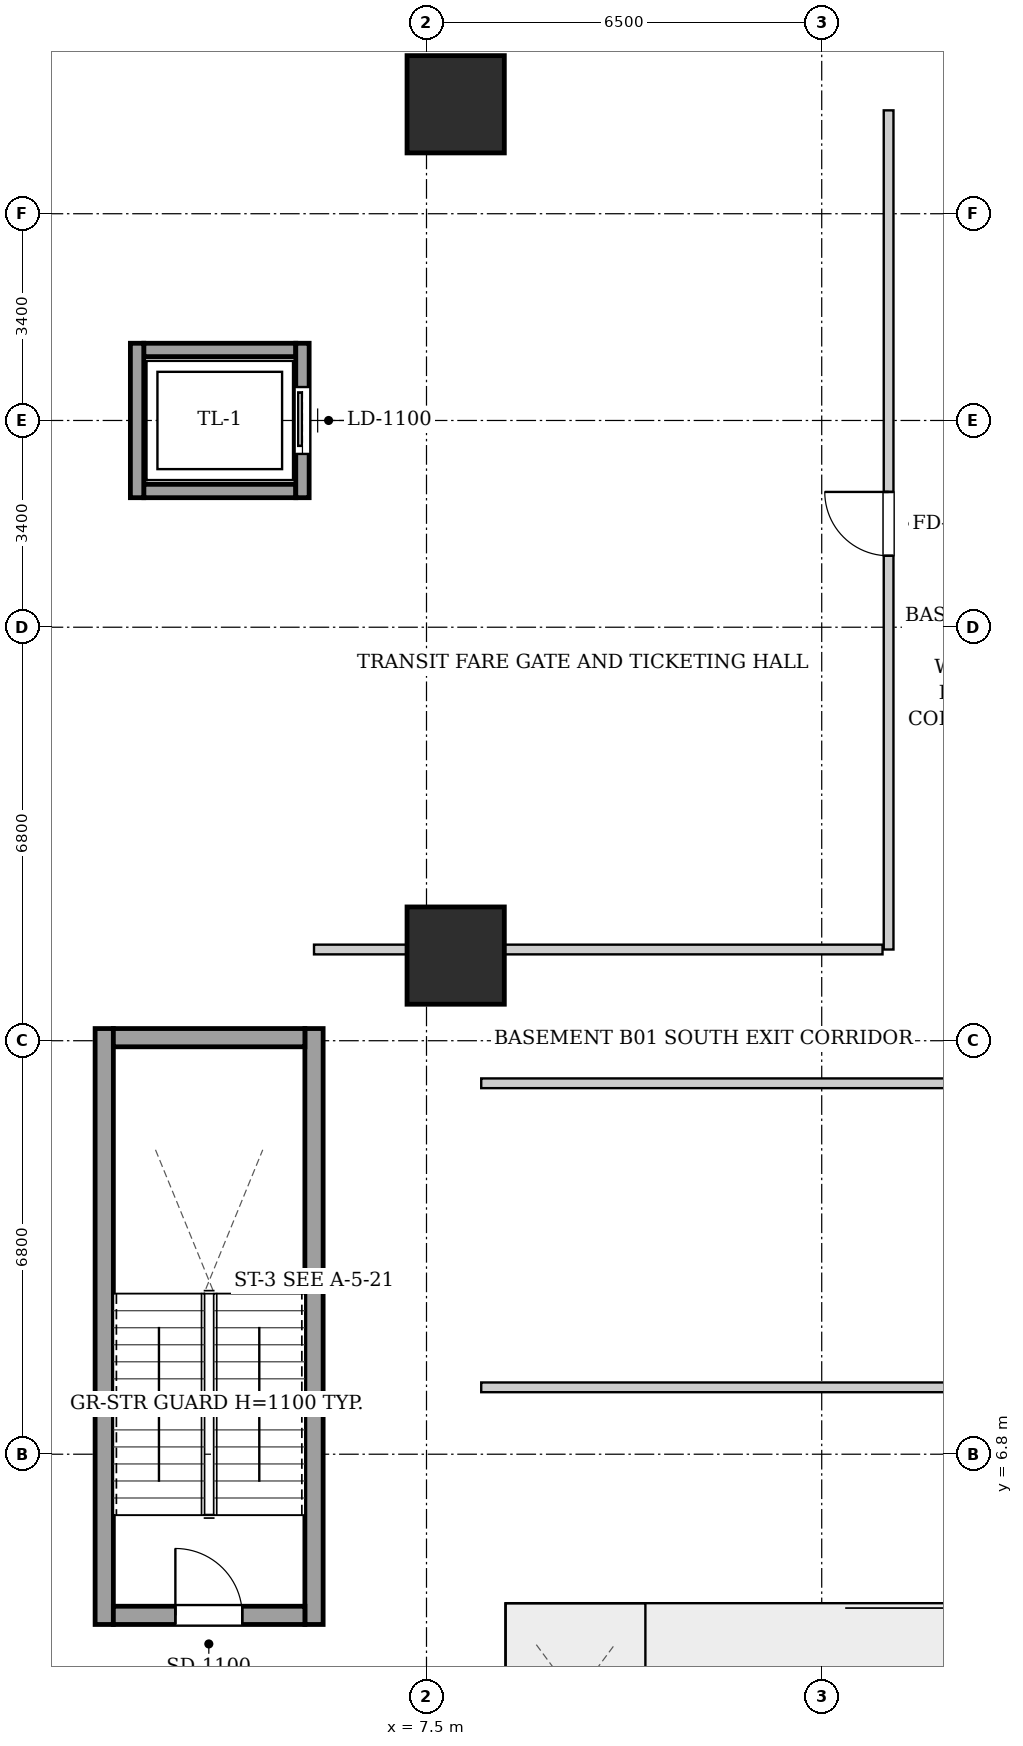
"""IFC4 building model, lengths in metres.
Left out: names, types, materials, properties, quantities, classifications, styles, units other than length and angle.
Written with IfcOpenShell. Run it as: python <this file> out.ifc"""

import sys

from ifc_helpers import new_model, si_unit, direction, frame, frame_2d, origin, origin_2d, place, context, subcontext, project, spatial, rectangle, extrude, element, fill, save


model = new_model("IFC4")
c1 = context("Model", 3, precision=1e-05, world=origin(), true_north=direction((0.0, 1.0)))
c2 = subcontext(c1, "Body", "Model", "MODEL_VIEW")
j1 = project(units=[si_unit("LENGTHUNIT", "METRE"), si_unit("PLANEANGLEUNIT", "RADIAN")], contexts=[c1])
p1 = place(None, origin())
s1 = spatial("IfcSite", under=j1, at=p1, CompositionType="ELEMENT")
p2 = place(p1, origin())
s2 = spatial("IfcBuilding", under=s1, at=p2, CompositionType="ELEMENT")
p3 = place(p2, frame((0.0, 0.0, -4.8)))
s3 = spatial("IfcBuildingStorey", under=s2, at=p3, CompositionType="ELEMENT", Elevation=-4.8)
for number, where, z_axis, x_axis in (
    (1, (7.98, 15.0, 0.0), (0.0, 0.0, 1.0), (1.0, 0.0, 0.0)),
    (2, (7.98, 29.0, 0.0), (0.0, 0.0, 1.0), (1.0, 0.0, 0.0)),
):
    element("IfcColumn", number, at=place(p3, frame(where, z_axis=z_axis, x_axis=x_axis)), inside=s3, PredefinedType="COLUMN", context=c2, shape_type="SweptSolid", body=[
        extrude(rectangle(XDim=1.6, YDim=1.6, at=origin_2d()), origin(), (0.0, 0.0, 1.0), 4.8),
    ])
for number, where, z_axis, x_axis in (
    (3, (2.2, 4.0, 0.0), (0.0, 0.0, 1.0), (0.0, 1.0, 0.0)),
    (4, (5.65, 4.0, 0.0), (0.0, 0.0, 1.0), (0.0, 1.0, 0.0)),
):
    element("IfcWall", number, at=place(p3, frame(where, z_axis=z_axis, x_axis=x_axis)), inside=s3, PredefinedType="SHEAR", context=c2, shape_type="SweptSolid", body=[
        extrude(rectangle(XDim=9.8, YDim=0.3, at=frame_2d((4.9, 0.0))), origin(), (0.0, 0.0, 1.0), 4.48),
    ])
p4 = place(p3, frame((2.35, 13.65, 0.0), z_axis=(0.0, 0.0, 1.0), x_axis=(1.0, 0.0, 0.0)))
e5 = element("IfcWall", 5, at=p4, inside=s3, PredefinedType="SHEAR", context=c2, shape_type="SweptSolid", body=[
    extrude(rectangle(XDim=3.15, YDim=0.3, at=frame_2d((1.575, 0.0))), origin(), (0.0, 0.0, 1.0), 4.48),
])
p5 = place(p3, frame((2.35, 4.15, 0.0), z_axis=(0.0, 0.0, 1.0), x_axis=(1.0, 0.0, 0.0)))
e6 = element("IfcWall", 6, at=p5, inside=s3, PredefinedType="SHEAR", context=c2, shape_type="SweptSolid", body=[
    extrude(rectangle(XDim=3.15, YDim=0.3, at=frame_2d((1.575, 0.0))), origin(), (0.0, 0.0, 1.0), 4.48),
])
p6 = place(p5, frame((1.02, 0.0, 0.0)))
e7 = element("IfcOpeningElement", 7, at=p6, cuts=e6, PredefinedType="OPENING", context=c2, shape_type="SweptSolid", body=[
    extrude(rectangle(XDim=1.1, YDim=2.05, at=frame_2d((0.55, 1.025))), frame((0.0, 0.16, 0.0), z_axis=(0.0, -1.0, 0.0), x_axis=(1.0, 0.0, 0.0)), (0.0, 0.0, 1.0), 0.32),
])
for number, where, z_axis, x_axis in (
    (8, (2.85, 22.64, 0.0), (0.0, 0.0, 1.0), (1.0, 0.0, 0.0)),
    (9, (2.85, 24.96, 0.0), (0.0, 0.0, 1.0), (1.0, 0.0, 0.0)),
):
    element("IfcWall", number, at=place(p3, frame(where, z_axis=z_axis, x_axis=x_axis)), inside=s3, PredefinedType="SHEAR", context=c2, shape_type="SweptSolid", body=[
        extrude(rectangle(XDim=2.5, YDim=0.22, at=frame_2d((1.25, 0.0))), origin(), (0.0, 0.0, 1.0), 4.48),
    ])
p7 = place(p3, frame((2.74, 22.53, 0.0), z_axis=(0.0, 0.0, 1.0), x_axis=(0.0, 1.0, 0.0)))
e10 = element("IfcWall", 10, at=p7, inside=s3, PredefinedType="SHEAR", context=c2, shape_type="SweptSolid", body=[
    extrude(rectangle(XDim=2.54, YDim=0.22, at=frame_2d((1.27, 0.0))), origin(), (0.0, 0.0, 1.0), 4.48),
])
p8 = place(p3, frame((5.46, 22.53, 0.0), z_axis=(0.0, 0.0, 1.0), x_axis=(0.0, 1.0, 0.0)))
e11 = element("IfcWall", 11, at=p8, inside=s3, PredefinedType="SHEAR", context=c2, shape_type="SweptSolid", body=[
    extrude(rectangle(XDim=2.54, YDim=0.22, at=frame_2d((1.27, 0.0))), origin(), (0.0, 0.0, 1.0), 4.48),
])
p9 = place(p8, frame((0.72, 0.0, 0.0)))
e12 = element("IfcOpeningElement", 12, at=p9, cuts=e11, PredefinedType="OPENING", context=c2, shape_type="SweptSolid", body=[
    extrude(rectangle(XDim=1.1, YDim=2.15, at=frame_2d((0.55, 1.075))), frame((0.0, 0.12, 0.0), z_axis=(0.0, -1.0, 0.0), x_axis=(1.0, 0.0, 0.0)), (0.0, 0.0, 1.0), 0.24),
])
p10 = place(p3, frame((15.1, 15.1, 0.0), z_axis=(0.0, 0.0, 1.0), x_axis=(0.0, 1.0, 0.0)))
e13 = element("IfcWall", 13, at=p10, inside=s3, PredefinedType="PARTITIONING", context=c2, shape_type="SweptSolid", body=[
    extrude(rectangle(XDim=13.8, YDim=0.16, at=frame_2d((6.9, 0.0))), origin(), (0.0, 0.0, 1.0), 4.48),
])
p11 = place(p10, frame((6.475, 0.0, 0.0)))
e14 = element("IfcOpeningElement", 14, at=p11, cuts=e13, PredefinedType="OPENING", context=c2, shape_type="SweptSolid", body=[
    extrude(rectangle(XDim=1.05, YDim=2.05, at=frame_2d((0.525, 1.025))), frame((0.0, 0.09, 0.0), z_axis=(0.0, -1.0, 0.0), x_axis=(1.0, 0.0, 0.0)), (0.0, 0.0, 1.0), 0.18),
])
p12 = place(p3, frame((5.65, 15.1, 0.0), z_axis=(0.0, 0.0, 1.0), x_axis=(1.0, 0.0, 0.0)))
e15 = element("IfcWall", 15, at=p12, inside=s3, PredefinedType="PARTITIONING", context=c2, shape_type="SweptSolid", body=[
    extrude(rectangle(XDim=9.35, YDim=0.16, at=frame_2d((4.675, 0.0))), origin(), (0.0, 0.0, 1.0), 3.565),
])
p13 = place(p3, frame((8.4, 12.9, 0.0), z_axis=(0.0, 0.0, 1.0), x_axis=(1.0, 0.0, 0.0)))
e16 = element("IfcWall", 16, at=p13, inside=s3, PredefinedType="PARTITIONING", context=c2, shape_type="SweptSolid", body=[
    extrude(rectangle(XDim=27.4, YDim=0.16, at=frame_2d((13.7, 0.0))), origin(), (0.0, 0.0, 1.0), 4.48),
])
p14 = place(p13, frame((10.05, 0.0, 0.0)))
e17 = element("IfcOpeningElement", 17, at=p14, cuts=e16, PredefinedType="OPENING", context=c2, shape_type="SweptSolid", body=[
    extrude(rectangle(XDim=0.9, YDim=2.05, at=frame_2d((0.45, 1.025))), frame((0.0, 0.09, 0.0), z_axis=(0.0, -1.0, 0.0), x_axis=(1.0, 0.0, 0.0)), (0.0, 0.0, 1.0), 0.18),
])
p15 = place(p3, frame((8.4, 7.9, 0.0), z_axis=(0.0, 0.0, 1.0), x_axis=(1.0, 0.0, 0.0)))
e18 = element("IfcWall", 18, at=p15, inside=s3, PredefinedType="PARTITIONING", context=c2, shape_type="SweptSolid", body=[
    extrude(rectangle(XDim=37.1, YDim=0.16, at=frame_2d((18.55, 0.0))), origin(), (0.0, 0.0, 1.0), 4.48),
])
p16 = place(p15, frame((30.975, 0.0, 0.0)))
e19 = element("IfcOpeningElement", 19, at=p16, cuts=e18, PredefinedType="OPENING", context=c2, shape_type="SweptSolid", body=[
    extrude(rectangle(XDim=1.05, YDim=2.05, at=frame_2d((0.525, 1.025))), frame((0.0, 0.09, 0.0), z_axis=(0.0, -1.0, 0.0), x_axis=(1.0, 0.0, 0.0)), (0.0, 0.0, 1.0), 0.18),
])
p17 = place(p6, origin())
e20 = element("IfcDoor", 20, at=p17, inside=s3, OperationType="SINGLE_SWING_LEFT", PredefinedType="DOOR", context=c2, shape_type="SweptSolid", body=[
    extrude(rectangle(XDim=1.1, YDim=2.05, at=frame_2d((0.55, 1.025))), frame((0.0, 0.025, 0.0), z_axis=(0.0, -1.0, 0.0), x_axis=(1.0, 0.0, 0.0)), (0.0, 0.0, 1.0), 0.05),
])
fill(e7, e20)
p18 = place(p9, origin())
e21 = element("IfcDoor", 21, at=p18, inside=s3, OperationType="SLIDING_TO_LEFT", PredefinedType="DOOR", context=c2, shape_type="SweptSolid", body=[
    extrude(rectangle(XDim=1.1, YDim=2.15, at=frame_2d((0.55, 1.075))), frame((0.0, 0.025, 0.0), z_axis=(0.0, -1.0, 0.0), x_axis=(1.0, 0.0, 0.0)), (0.0, 0.0, 1.0), 0.05),
])
fill(e12, e21)
p19 = place(p11, origin())
e22 = element("IfcDoor", 22, at=p19, inside=s3, OperationType="SINGLE_SWING_RIGHT", PredefinedType="DOOR", context=c2, shape_type="SweptSolid", body=[
    extrude(rectangle(XDim=1.05, YDim=2.05, at=frame_2d((0.525, 1.025))), frame((0.0, 0.025, 0.0), z_axis=(0.0, -1.0, 0.0), x_axis=(1.0, 0.0, 0.0)), (0.0, 0.0, 1.0), 0.05),
])
fill(e14, e22)
save(model, sys.argv[1])
